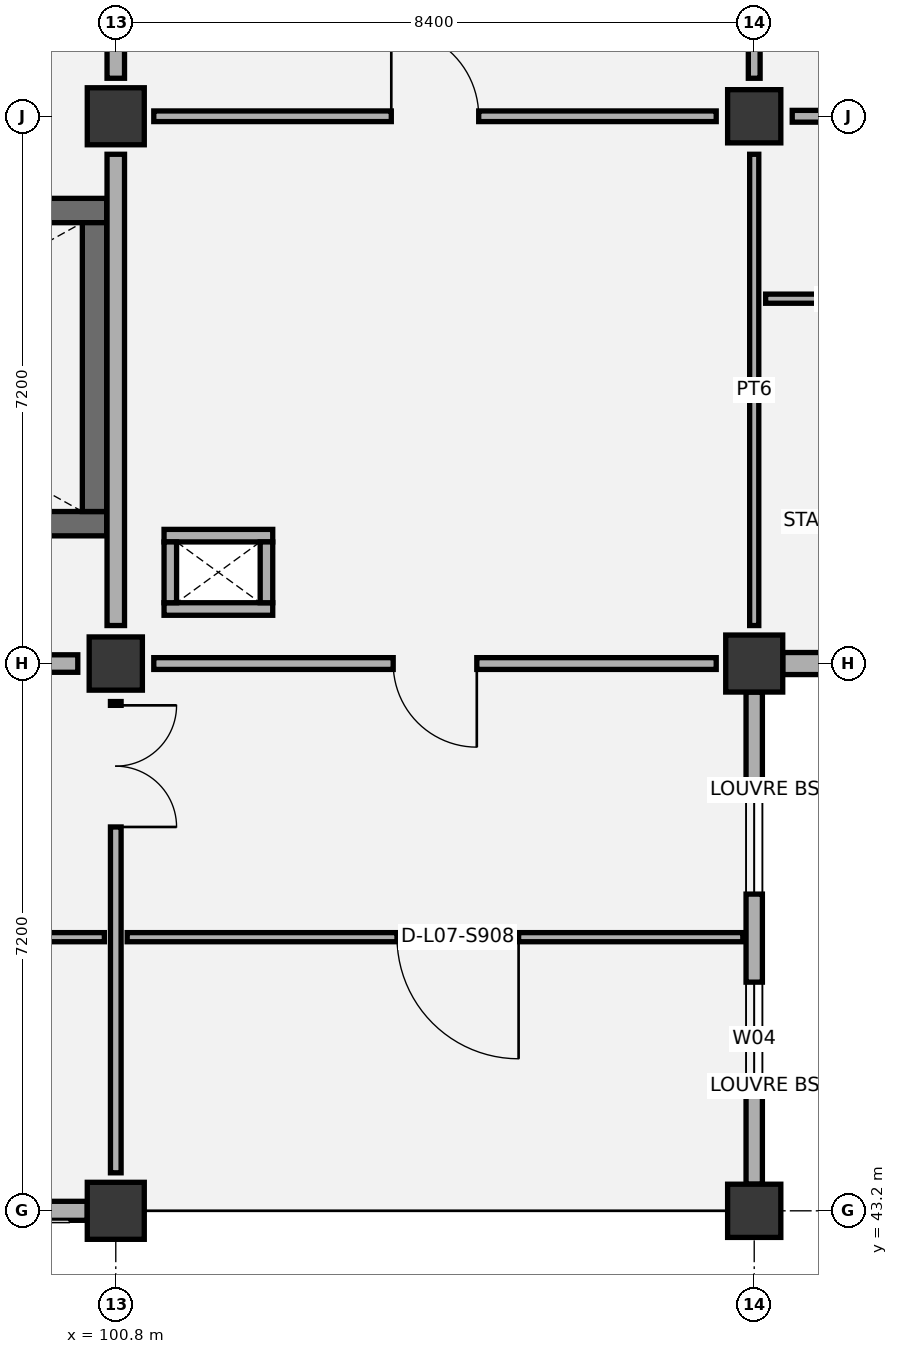
"""IFC4 building model, lengths in metres.
Left out: names, types, materials, properties, quantities, classifications, styles, units other than length and angle.
Written with IfcOpenShell. Run it as: python <this file> out.ifc"""

import sys

from ifc_helpers import new_model, si_unit, direction, frame, frame_2d, origin, origin_2d, place, context, subcontext, project, spatial, rectangle, extrude, element, fill, save


model = new_model("IFC4")
c1 = context("Model", 3, precision=1e-05, world=origin(), true_north=direction((0.0, 1.0)))
c2 = subcontext(c1, "Body", "Model", "MODEL_VIEW")
j1 = project(units=[si_unit("LENGTHUNIT", "METRE"), si_unit("PLANEANGLEUNIT", "RADIAN")], contexts=[c1])
p1 = place(None, origin())
s1 = spatial("IfcSite", under=j1, at=p1, CompositionType="ELEMENT")
p2 = place(p1, origin())
s2 = spatial("IfcBuilding", under=s1, at=p2, CompositionType="ELEMENT")
p3 = place(p2, frame((0.0, 0.0, 35.4)))
s3 = spatial("IfcBuildingStorey", under=s2, at=p3, CompositionType="ELEMENT", Elevation=35.4)
p4 = place(p3, frame((100.8, 43.2, 0.0), z_axis=(0.0, 0.0, 1.0), x_axis=(1.0, 0.0, 0.0)))
e1 = element("IfcColumn", 1, at=p4, inside=s3, PredefinedType="COLUMN", context=c2, shape_type="SweptSolid", body=[
    extrude(rectangle(XDim=0.75, YDim=0.75, at=origin_2d()), origin(), (0.0, 0.0, 1.0), 4.2),
])
p5 = place(p3, frame((100.8, 50.4, 0.0), z_axis=(0.0, 0.0, 1.0), x_axis=(1.0, 0.0, 0.0)))
e2 = element("IfcColumn", 2, at=p5, inside=s3, PredefinedType="COLUMN", context=c2, shape_type="SweptSolid", body=[
    extrude(rectangle(XDim=0.7, YDim=0.7, at=origin_2d()), origin(), (0.0, 0.0, 1.0), 4.2),
])
p6 = place(p3, frame((100.8, 57.6, 0.0), z_axis=(0.0, 0.0, 1.0), x_axis=(1.0, 0.0, 0.0)))
e3 = element("IfcColumn", 3, at=p6, inside=s3, PredefinedType="COLUMN", context=c2, shape_type="SweptSolid", body=[
    extrude(rectangle(XDim=0.75, YDim=0.75, at=origin_2d()), origin(), (0.0, 0.0, 1.0), 4.2),
])
p7 = place(p3, frame((109.2, 43.2, 0.0), z_axis=(0.0, 0.0, 1.0), x_axis=(1.0, 0.0, 0.0)))
e4 = element("IfcColumn", 4, at=p7, inside=s3, PredefinedType="COLUMN", context=c2, shape_type="SweptSolid", body=[
    extrude(rectangle(XDim=0.7, YDim=0.7, at=origin_2d()), origin(), (0.0, 0.0, 1.0), 4.2),
])
p8 = place(p3, frame((109.2, 50.4, 0.0), z_axis=(0.0, 0.0, 1.0), x_axis=(1.0, 0.0, 0.0)))
e5 = element("IfcColumn", 5, at=p8, inside=s3, PredefinedType="COLUMN", context=c2, shape_type="SweptSolid", body=[
    extrude(rectangle(XDim=0.75, YDim=0.75, at=origin_2d()), origin(), (0.0, 0.0, 1.0), 4.2),
])
p9 = place(p3, frame((109.2, 57.6, 0.0), z_axis=(0.0, 0.0, 1.0), x_axis=(1.0, 0.0, 0.0)))
e6 = element("IfcColumn", 6, at=p9, inside=s3, PredefinedType="COLUMN", context=c2, shape_type="SweptSolid", body=[
    extrude(rectangle(XDim=0.7, YDim=0.7, at=origin_2d()), origin(), (0.0, 0.0, 1.0), 4.2),
])
p10 = place(p3, frame((93.2, 52.24, 0.0), z_axis=(0.0, 0.0, 1.0), x_axis=(1.0, 0.0, 0.0)))
e7 = element("IfcWall", 7, at=p10, inside=s3, PredefinedType="SHEAR", context=c2, shape_type="SweptSolid", body=[
    extrude(rectangle(XDim=7.48, YDim=0.32, at=frame_2d((3.74, 0.0))), origin(), (0.0, 0.0, 1.0), 3.92),
])
p11 = place(p10, frame((0.45, 0.0, 0.0)))
e8 = element("IfcOpeningElement", 8, at=p11, cuts=e7, PredefinedType="OPENING", context=c2, shape_type="SweptSolid", body=[
    extrude(rectangle(XDim=1.05, YDim=2.15, at=frame_2d((0.525, 1.075))), frame((0.0, 0.17, 0.0), z_axis=(0.0, -1.0, 0.0), x_axis=(1.0, 0.0, 0.0)), (0.0, 0.0, 1.0), 0.34),
])
p12 = place(p3, frame((93.2, 56.36, 0.0), z_axis=(0.0, 0.0, 1.0), x_axis=(1.0, 0.0, 0.0)))
e9 = element("IfcWall", 9, at=p12, inside=s3, PredefinedType="SHEAR", context=c2, shape_type="SweptSolid", body=[
    extrude(rectangle(XDim=7.48, YDim=0.32, at=frame_2d((3.74, 0.0))), origin(), (0.0, 0.0, 1.0), 3.92),
])
p13 = place(p3, frame((100.52, 52.4, 0.0), z_axis=(0.0, 0.0, 1.0), x_axis=(0.0, 1.0, 0.0)))
e10 = element("IfcWall", 10, at=p13, inside=s3, PredefinedType="SHEAR", context=c2, shape_type="SweptSolid", body=[
    extrude(rectangle(XDim=3.8, YDim=0.32, at=frame_2d((1.9, 0.0))), origin(), (0.0, 0.0, 1.0), 3.92),
])
p14 = place(p3, frame((92.75, 43.2, 0.0), z_axis=(0.0, 0.0, 1.0), x_axis=(1.0, 0.0, 0.0)))
e11 = element("IfcWall", 11, at=p14, inside=s3, PredefinedType="SOLIDWALL", context=c2, shape_type="SweptSolid", body=[
    extrude(rectangle(XDim=7.675, YDim=0.25, at=frame_2d((3.837, 0.0))), origin(), (0.0, 0.0, 1.0), 3.365),
])
p15 = place(p14, frame((0.958, 0.0, 0.9)))
e12 = element("IfcOpeningElement", 12, at=p15, cuts=e11, PredefinedType="OPENING", context=c2, shape_type="SweptSolid", body=[
    extrude(rectangle(XDim=2.4, YDim=1.8, at=frame_2d((1.2, 0.9))), frame((0.0, 0.135, 0.0), z_axis=(0.0, -1.0, 0.0), x_axis=(1.0, 0.0, 0.0)), (0.0, 0.0, 1.0), 0.27),
])
p16 = place(p14, frame((4.317, 0.0, 0.9)))
e13 = element("IfcOpeningElement", 13, at=p16, cuts=e11, PredefinedType="OPENING", context=c2, shape_type="SweptSolid", body=[
    extrude(rectangle(XDim=2.4, YDim=1.8, at=frame_2d((1.2, 0.9))), frame((0.0, 0.135, 0.0), z_axis=(0.0, -1.0, 0.0), x_axis=(1.0, 0.0, 0.0)), (0.0, 0.0, 1.0), 0.27),
])
p17 = place(p3, frame((109.2, 43.55, 0.0), z_axis=(0.0, 0.0, 1.0), x_axis=(0.0, 1.0, 0.0)))
e14 = element("IfcWall", 14, at=p17, inside=s3, PredefinedType="SOLIDWALL", context=c2, shape_type="SweptSolid", body=[
    extrude(rectangle(XDim=6.475, YDim=0.215, at=frame_2d((3.237, 0.0))), origin(), (0.0, 0.0, 1.0), 3.365),
])
p18 = place(p17, frame((1.158, 0.0, 0.9)))
e15 = element("IfcOpeningElement", 15, at=p18, cuts=e14, PredefinedType="OPENING", context=c2, shape_type="SweptSolid", body=[
    extrude(rectangle(XDim=1.5, YDim=1.8, at=frame_2d((0.75, 0.9))), frame((0.0, 0.117, 0.0), z_axis=(0.0, -1.0, 0.0), x_axis=(1.0, 0.0, 0.0)), (0.0, 0.0, 1.0), 0.235),
])
p19 = place(p17, frame((3.817, 0.0, 0.9)))
e16 = element("IfcOpeningElement", 16, at=p19, cuts=e14, PredefinedType="OPENING", context=c2, shape_type="SweptSolid", body=[
    extrude(rectangle(XDim=1.5, YDim=1.8, at=frame_2d((0.75, 0.9))), frame((0.0, 0.117, 0.0), z_axis=(0.0, -1.0, 0.0), x_axis=(1.0, 0.0, 0.0)), (0.0, 0.0, 1.0), 0.235),
])
p20 = place(p3, frame((109.575, 50.4, 0.0), z_axis=(0.0, 0.0, 1.0), x_axis=(1.0, 0.0, 0.0)))
e17 = element("IfcWall", 17, at=p20, inside=s3, PredefinedType="SOLIDWALL", context=c2, shape_type="SweptSolid", body=[
    extrude(rectangle(XDim=7.675, YDim=0.29, at=frame_2d((3.837, 0.0))), origin(), (0.0, 0.0, 1.0), 3.365),
])
p21 = place(p3, frame((109.32, 43.2, 0.0), z_axis=(0.0, 0.0, 1.0), x_axis=(1.0, 0.0, 0.0)))
e18 = element("IfcWall", 18, at=p21, inside=s3, PredefinedType="PARAPET", context=c2, shape_type="SweptSolid", body=[
    extrude(rectangle(XDim=8.16, YDim=0.185, at=frame_2d((4.08, 0.0))), origin(), (0.0, 0.0, 1.0), 1.15),
])
for number, where, z_axis, x_axis in (
    (19, (101.435, 51.117, 0.0), (0.0, 0.0, 1.0), (1.0, 0.0, 0.0)),
    (20, (101.435, 52.083, 0.0), (0.0, 0.0, 1.0), (1.0, 0.0, 0.0)),
):
    element("IfcWall", number, at=place(p3, frame(where, z_axis=z_axis, x_axis=x_axis)), inside=s3, PredefinedType="PARTITIONING", context=c2, shape_type="SweptSolid", body=[
        extrude(rectangle(XDim=1.43, YDim=0.165, at=frame_2d((0.715, 0.0))), origin(), (0.0, 0.0, 1.0), 3.92),
    ])
for number, where, z_axis, x_axis in (
    (21, (101.518, 51.2, 0.0), (0.0, 0.0, 1.0), (0.0, 1.0, 0.0)),
    (22, (102.782, 51.2, 0.0), (0.0, 0.0, 1.0), (0.0, 1.0, 0.0)),
):
    element("IfcWall", number, at=place(p3, frame(where, z_axis=z_axis, x_axis=x_axis)), inside=s3, PredefinedType="PARTITIONING", context=c2, shape_type="SweptSolid", body=[
        extrude(rectangle(XDim=0.8, YDim=0.165, at=frame_2d((0.4, 0.0))), origin(), (0.0, 0.0, 1.0), 3.92),
    ])
p22 = place(p3, frame((109.35, 55.2, 0.0), z_axis=(0.0, 0.0, 1.0), x_axis=(1.0, 0.0, 0.0)))
e23 = element("IfcWall", 23, at=p22, inside=s3, PredefinedType="PARTITIONING", context=c2, shape_type="SweptSolid", body=[
    extrude(rectangle(XDim=8.1, YDim=0.12, at=frame_2d((4.05, 0.0))), origin(), (0.0, 0.0, 1.0), 3.92),
])
p23 = place(p22, frame((1.08, 0.0, 0.0)))
e24 = element("IfcOpeningElement", 24, at=p23, cuts=e23, PredefinedType="OPENING", context=c2, shape_type="SweptSolid", body=[
    extrude(rectangle(XDim=0.95, YDim=2.1, at=frame_2d((0.475, 1.05))), frame((0.0, 0.07, 0.0), z_axis=(0.0, -1.0, 0.0), x_axis=(1.0, 0.0, 0.0)), (0.0, 0.0, 1.0), 0.14),
])
p24 = place(p22, frame((3.63, 0.0, 0.0)))
e25 = element("IfcOpeningElement", 25, at=p24, cuts=e23, PredefinedType="OPENING", context=c2, shape_type="SweptSolid", body=[
    extrude(rectangle(XDim=0.9, YDim=2.1, at=frame_2d((0.45, 1.05))), frame((0.0, 0.07, 0.0), z_axis=(0.0, -1.0, 0.0), x_axis=(1.0, 0.0, 0.0)), (0.0, 0.0, 1.0), 0.14),
])
p25 = place(p22, frame((6.13, 0.0, 0.0)))
e26 = element("IfcOpeningElement", 26, at=p25, cuts=e23, PredefinedType="OPENING", context=c2, shape_type="SweptSolid", body=[
    extrude(rectangle(XDim=1.0, YDim=2.1, at=frame_2d((0.5, 1.05))), frame((0.0, 0.07, 0.0), z_axis=(0.0, -1.0, 0.0), x_axis=(1.0, 0.0, 0.0)), (0.0, 0.0, 1.0), 0.14),
])
p26 = place(p3, frame((92.55, 46.8, 0.0), z_axis=(0.0, 0.0, 1.0), x_axis=(1.0, 0.0, 0.0)))
e27 = element("IfcWall", 27, at=p26, inside=s3, PredefinedType="PARTITIONING", context=c2, shape_type="SweptSolid", body=[
    extrude(rectangle(XDim=8.1, YDim=0.12, at=frame_2d((4.05, 0.0))), origin(), (0.0, 0.0, 1.0), 3.92),
])
p27 = place(p26, frame((3.55, 0.0, 0.0)))
e28 = element("IfcOpeningElement", 28, at=p27, cuts=e27, PredefinedType="OPENING", context=c2, shape_type="SweptSolid", body=[
    extrude(rectangle(XDim=1.6, YDim=2.2, at=frame_2d((0.8, 1.1))), frame((0.0, 0.07, 0.0), z_axis=(0.0, -1.0, 0.0), x_axis=(1.0, 0.0, 0.0)), (0.0, 0.0, 1.0), 0.14),
])
p28 = place(p3, frame((100.95, 46.8, 0.0), z_axis=(0.0, 0.0, 1.0), x_axis=(1.0, 0.0, 0.0)))
e29 = element("IfcWall", 29, at=p28, inside=s3, PredefinedType="PARTITIONING", context=c2, shape_type="SweptSolid", body=[
    extrude(rectangle(XDim=8.1, YDim=0.12, at=frame_2d((4.05, 0.0))), origin(), (0.0, 0.0, 1.0), 3.92),
])
p29 = place(p28, frame((3.55, 0.0, 0.0)))
e30 = element("IfcOpeningElement", 30, at=p29, cuts=e29, PredefinedType="OPENING", context=c2, shape_type="SweptSolid", body=[
    extrude(rectangle(XDim=1.6, YDim=2.2, at=frame_2d((0.8, 1.1))), frame((0.0, 0.07, 0.0), z_axis=(0.0, -1.0, 0.0), x_axis=(1.0, 0.0, 0.0)), (0.0, 0.0, 1.0), 0.14),
])
p30 = place(p3, frame((100.8, 43.7, 0.0), z_axis=(0.0, 0.0, 1.0), x_axis=(0.0, 1.0, 0.0)))
e31 = element("IfcWall", 31, at=p30, inside=s3, PredefinedType="PARTITIONING", context=c2, shape_type="SweptSolid", body=[
    extrude(rectangle(XDim=6.2, YDim=0.14, at=frame_2d((3.1, 0.0))), origin(), (0.0, 0.0, 1.0), 3.315),
])
p31 = place(p30, frame((4.55, 0.0, 0.0)))
e32 = element("IfcOpeningElement", 32, at=p31, cuts=e31, PredefinedType="OPENING", context=c2, shape_type="SweptSolid", body=[
    extrude(rectangle(XDim=1.6, YDim=2.2, at=frame_2d((0.8, 1.1))), frame((0.0, 0.08, 0.0), z_axis=(0.0, -1.0, 0.0), x_axis=(1.0, 0.0, 0.0)), (0.0, 0.0, 1.0), 0.16),
])
p32 = place(p3, frame((92.9, 50.4, 0.0), z_axis=(0.0, 0.0, 1.0), x_axis=(1.0, 0.0, 0.0)))
e33 = element("IfcWall", 33, at=p32, inside=s3, PredefinedType="PARTITIONING", context=c2, shape_type="SweptSolid", body=[
    extrude(rectangle(XDim=7.4, YDim=0.23, at=frame_2d((3.7, 0.0))), origin(), (0.0, 0.0, 1.0), 3.645),
])
p33 = place(p32, frame((2.95, 0.0, 0.0)))
e34 = element("IfcOpeningElement", 34, at=p33, cuts=e33, PredefinedType="OPENING", context=c2, shape_type="SweptSolid", body=[
    extrude(rectangle(XDim=1.5, YDim=2.15, at=frame_2d((0.75, 1.075))), frame((0.0, 0.125, 0.0), z_axis=(0.0, -1.0, 0.0), x_axis=(1.0, 0.0, 0.0)), (0.0, 0.0, 1.0), 0.25),
])
p34 = place(p3, frame((100.8, 50.9, 0.0), z_axis=(0.0, 0.0, 1.0), x_axis=(0.0, 1.0, 0.0)))
e35 = element("IfcWall", 35, at=p34, inside=s3, PredefinedType="PARTITIONING", context=c2, shape_type="SweptSolid", body=[
    extrude(rectangle(XDim=6.2, YDim=0.23, at=frame_2d((3.1, 0.0))), origin(), (0.0, 0.0, 1.0), 3.625),
])
p35 = place(p3, frame((100.8, 58.1, 0.0), z_axis=(0.0, 0.0, 1.0), x_axis=(0.0, 1.0, 0.0)))
e36 = element("IfcWall", 36, at=p35, inside=s3, PredefinedType="PARTITIONING", context=c2, shape_type="SweptSolid", body=[
    extrude(rectangle(XDim=6.2, YDim=0.23, at=frame_2d((3.1, 0.0))), origin(), (0.0, 0.0, 1.0), 3.315),
])
p36 = place(p3, frame((101.3, 50.4, 0.0), z_axis=(0.0, 0.0, 1.0), x_axis=(1.0, 0.0, 0.0)))
e37 = element("IfcWall", 37, at=p36, inside=s3, PredefinedType="PARTITIONING", context=c2, shape_type="SweptSolid", body=[
    extrude(rectangle(XDim=7.4, YDim=0.155, at=frame_2d((3.7, 0.0))), origin(), (0.0, 0.0, 1.0), 3.315),
])
p37 = place(p36, frame((3.15, 0.0, 0.0)))
e38 = element("IfcOpeningElement", 38, at=p37, cuts=e37, PredefinedType="OPENING", context=c2, shape_type="SweptSolid", body=[
    extrude(rectangle(XDim=1.1, YDim=2.1, at=frame_2d((0.55, 1.05))), frame((0.0, 0.087, 0.0), z_axis=(0.0, -1.0, 0.0), x_axis=(1.0, 0.0, 0.0)), (0.0, 0.0, 1.0), 0.175),
])
p38 = place(p3, frame((109.2, 50.9, 0.0), z_axis=(0.0, 0.0, 1.0), x_axis=(0.0, 1.0, 0.0)))
e39 = element("IfcWall", 39, at=p38, inside=s3, PredefinedType="PARTITIONING", context=c2, shape_type="SweptSolid", body=[
    extrude(rectangle(XDim=6.2, YDim=0.12, at=frame_2d((3.1, 0.0))), origin(), (0.0, 0.0, 1.0), 3.315),
])
p39 = place(p3, frame((101.3, 57.6, 0.0), z_axis=(0.0, 0.0, 1.0), x_axis=(1.0, 0.0, 0.0)))
e40 = element("IfcWall", 40, at=p39, inside=s3, PredefinedType="PARTITIONING", context=c2, shape_type="SweptSolid", body=[
    extrude(rectangle(XDim=7.4, YDim=0.14, at=frame_2d((3.7, 0.0))), origin(), (0.0, 0.0, 1.0), 3.315),
])
p40 = place(p39, frame((3.125, 0.0, 0.0)))
e41 = element("IfcOpeningElement", 41, at=p40, cuts=e40, PredefinedType="OPENING", context=c2, shape_type="SweptSolid", body=[
    extrude(rectangle(XDim=1.15, YDim=2.1, at=frame_2d((0.575, 1.05))), frame((0.0, 0.08, 0.0), z_axis=(0.0, -1.0, 0.0), x_axis=(1.0, 0.0, 0.0)), (0.0, 0.0, 1.0), 0.16),
])
p41 = place(p3, frame((109.2, 58.1, 0.0), z_axis=(0.0, 0.0, 1.0), x_axis=(0.0, 1.0, 0.0)))
e42 = element("IfcWall", 42, at=p41, inside=s3, PredefinedType="PARTITIONING", context=c2, shape_type="SweptSolid", body=[
    extrude(rectangle(XDim=6.2, YDim=0.155, at=frame_2d((3.1, 0.0))), origin(), (0.0, 0.0, 1.0), 3.415),
])
p42 = place(p41, frame((2.55, 0.0, 0.0)))
e43 = element("IfcOpeningElement", 43, at=p42, cuts=e42, PredefinedType="OPENING", context=c2, shape_type="SweptSolid", body=[
    extrude(rectangle(XDim=1.1, YDim=2.1, at=frame_2d((0.55, 1.05))), frame((0.0, 0.087, 0.0), z_axis=(0.0, -1.0, 0.0), x_axis=(1.0, 0.0, 0.0)), (0.0, 0.0, 1.0), 0.175),
])
p43 = place(p3, frame((109.7, 57.6, 0.0), z_axis=(0.0, 0.0, 1.0), x_axis=(1.0, 0.0, 0.0)))
e44 = element("IfcWall", 44, at=p43, inside=s3, PredefinedType="PARTITIONING", context=c2, shape_type="SweptSolid", body=[
    extrude(rectangle(XDim=7.4, YDim=0.155, at=frame_2d((3.7, 0.0))), origin(), (0.0, 0.0, 1.0), 3.265),
])
p44 = place(p43, frame((3.15, 0.0, 0.0)))
e45 = element("IfcOpeningElement", 45, at=p44, cuts=e44, PredefinedType="OPENING", context=c2, shape_type="SweptSolid", body=[
    extrude(rectangle(XDim=1.1, YDim=2.1, at=frame_2d((0.55, 1.05))), frame((0.0, 0.087, 0.0), z_axis=(0.0, -1.0, 0.0), x_axis=(1.0, 0.0, 0.0)), (0.0, 0.0, 1.0), 0.175),
])
p45 = place(p18, origin())
e46 = element("IfcWindow", 46, at=p45, inside=s3, PartitioningType="SINGLE_PANEL", PredefinedType="WINDOW", context=c2, shape_type="SweptSolid", body=[
    extrude(rectangle(XDim=1.5, YDim=1.8, at=frame_2d((0.75, 0.9))), frame((0.0, 0.03, 0.0), z_axis=(0.0, -1.0, 0.0), x_axis=(1.0, 0.0, 0.0)), (0.0, 0.0, 1.0), 0.06),
])
fill(e15, e46)
p46 = place(p19, origin())
e47 = element("IfcWindow", 47, at=p46, inside=s3, PartitioningType="SINGLE_PANEL", PredefinedType="WINDOW", context=c2, shape_type="SweptSolid", body=[
    extrude(rectangle(XDim=1.5, YDim=1.8, at=frame_2d((0.75, 0.9))), frame((0.0, 0.03, 0.0), z_axis=(0.0, -1.0, 0.0), x_axis=(1.0, 0.0, 0.0)), (0.0, 0.0, 1.0), 0.06),
])
fill(e16, e47)
p47 = place(p29, frame((1.6, 0.0, 0.0), z_axis=(0.0, 0.0, 1.0), x_axis=(-1.0, 0.0, 0.0)))
e48 = element("IfcDoor", 48, at=p47, inside=s3, OperationType="SINGLE_SWING_LEFT", PredefinedType="DOOR", context=c2, shape_type="SweptSolid", body=[
    extrude(rectangle(XDim=1.6, YDim=2.2, at=frame_2d((0.8, 1.1))), frame((0.0, 0.025, 0.0), z_axis=(0.0, -1.0, 0.0), x_axis=(1.0, 0.0, 0.0)), (0.0, 0.0, 1.0), 0.05),
])
fill(e30, e48)
p48 = place(p31, frame((1.6, 0.0, 0.0), z_axis=(0.0, 0.0, 1.0), x_axis=(-1.0, 0.0, 0.0)))
e49 = element("IfcDoor", 49, at=p48, inside=s3, OperationType="DOUBLE_DOOR_SINGLE_SWING", PredefinedType="DOOR", context=c2, shape_type="SweptSolid", body=[
    extrude(rectangle(XDim=1.6, YDim=2.2, at=frame_2d((0.8, 1.1))), frame((0.0, 0.025, 0.0), z_axis=(0.0, -1.0, 0.0), x_axis=(1.0, 0.0, 0.0)), (0.0, 0.0, 1.0), 0.05),
])
fill(e32, e49)
p49 = place(p37, frame((1.1, 0.0, 0.0), z_axis=(0.0, 0.0, 1.0), x_axis=(-1.0, 0.0, 0.0)))
e50 = element("IfcDoor", 50, at=p49, inside=s3, OperationType="SINGLE_SWING_LEFT", PredefinedType="DOOR", context=c2, shape_type="SweptSolid", body=[
    extrude(rectangle(XDim=1.1, YDim=2.1, at=frame_2d((0.55, 1.05))), frame((0.0, 0.025, 0.0), z_axis=(0.0, -1.0, 0.0), x_axis=(1.0, 0.0, 0.0)), (0.0, 0.0, 1.0), 0.05),
])
fill(e38, e50)
p50 = place(p40, origin())
e51 = element("IfcDoor", 51, at=p50, inside=s3, OperationType="SINGLE_SWING_LEFT", PredefinedType="DOOR", context=c2, shape_type="SweptSolid", body=[
    extrude(rectangle(XDim=1.15, YDim=2.1, at=frame_2d((0.575, 1.05))), frame((0.0, 0.025, 0.0), z_axis=(0.0, -1.0, 0.0), x_axis=(1.0, 0.0, 0.0)), (0.0, 0.0, 1.0), 0.05),
])
fill(e41, e51)
save(model, sys.argv[1])
